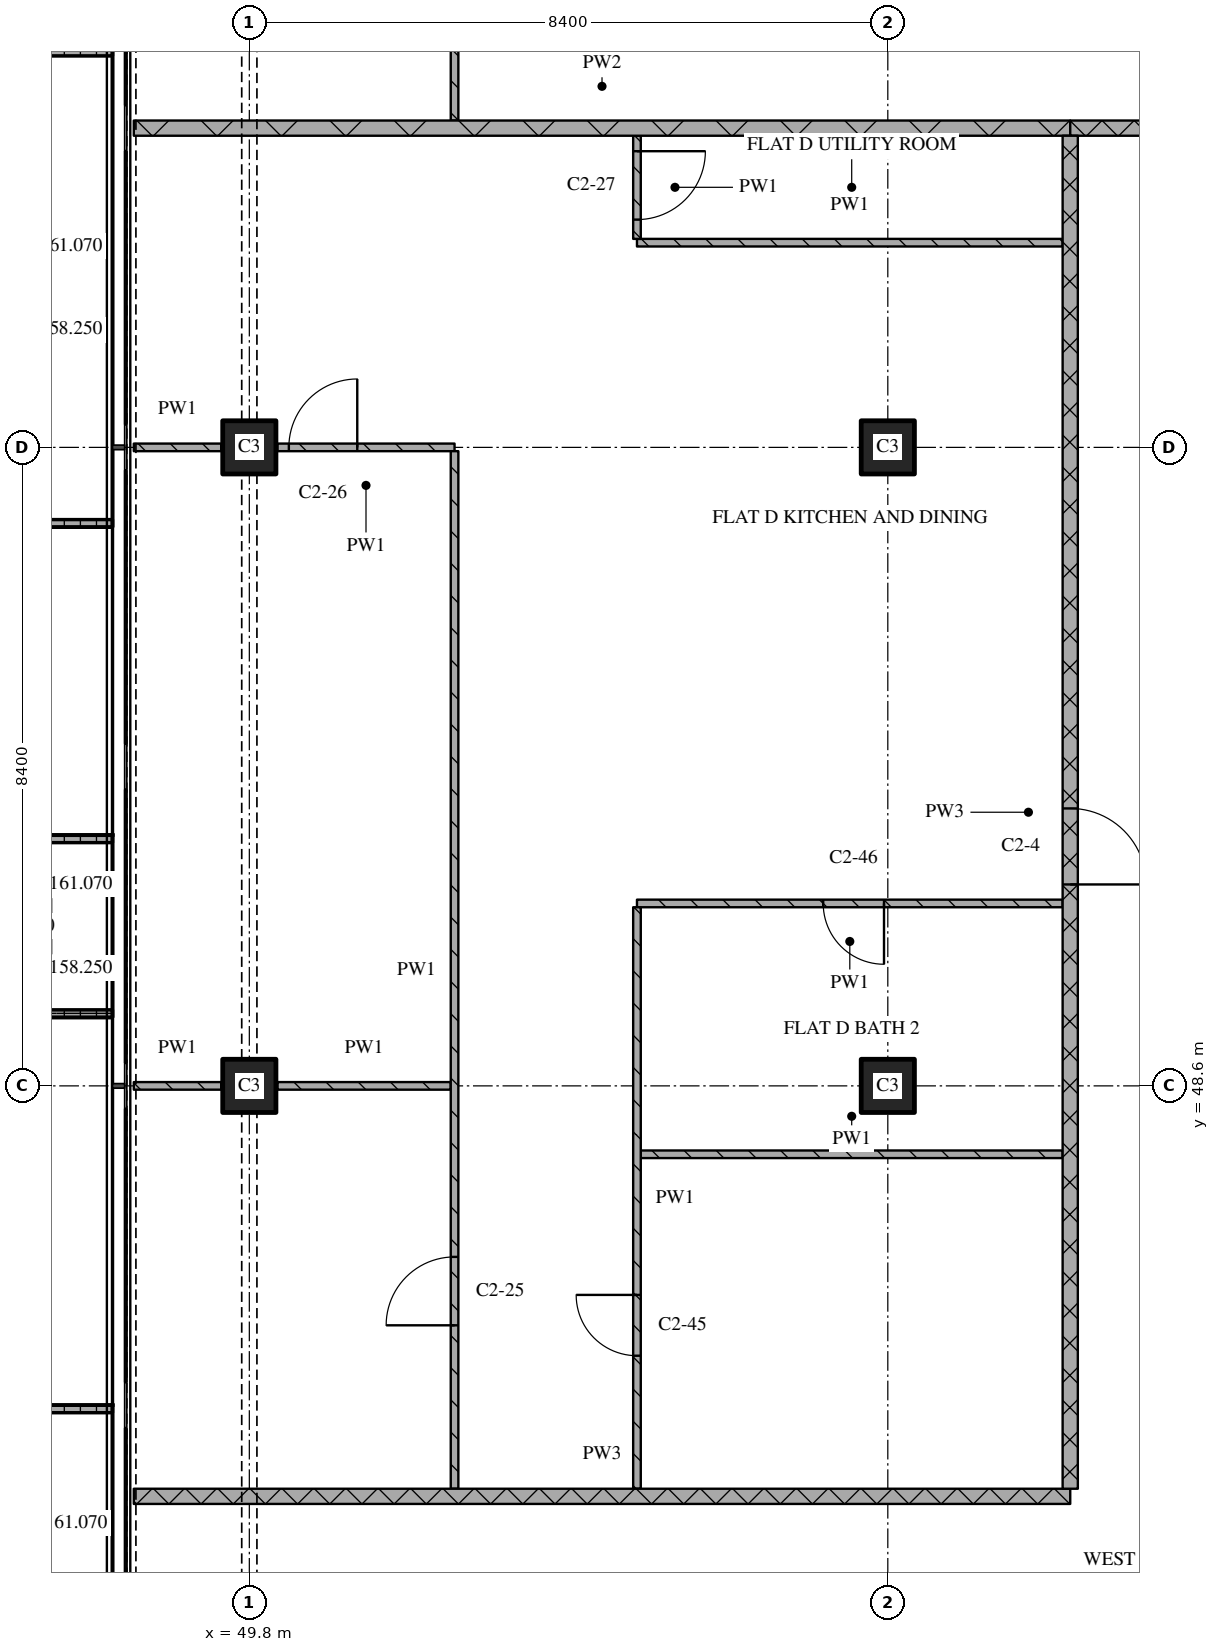
"""IFC4 building model, lengths in metres.
Left out: names, types, materials, properties, quantities, classifications, styles, units other than length and angle.
Written with IfcOpenShell. Run it as: python <this file> out.ifc"""

import sys

from ifc_helpers import new_model, si_unit, direction, frame, frame_2d, origin, origin_2d, place, context, subcontext, project, spatial, polyline, rectangle, outline, extrude, element, fill, save


model = new_model("IFC4")
c1 = context("Model", 3, precision=1e-05, world=origin(), true_north=direction((0.0, 1.0)))
c2 = subcontext(c1, "Body", "Model", "MODEL_VIEW")
j1 = project(units=[si_unit("LENGTHUNIT", "METRE"), si_unit("PLANEANGLEUNIT", "RADIAN")], contexts=[c1])
p1 = place(None, origin())
s1 = spatial("IfcSite", under=j1, at=p1, CompositionType="ELEMENT")
p2 = place(p1, origin())
s2 = spatial("IfcBuilding", under=s1, at=p2, CompositionType="ELEMENT")
p3 = place(p2, frame((0.0, 0.0, 158.25)))
s3 = spatial("IfcBuildingStorey", under=s2, at=p3, CompositionType="ELEMENT", Elevation=158.25)
for number, where, z_axis, x_axis in (
    (1, (49.8, 48.6, 0.0), (0.0, 0.0, 1.0), (1.0, 0.0, 0.0)),
    (2, (49.8, 57.0, 0.0), (0.0, 0.0, 1.0), (1.0, 0.0, 0.0)),
    (3, (58.2, 48.6, 0.0), (0.0, 0.0, 1.0), (1.0, 0.0, 0.0)),
    (4, (58.2, 57.0, 0.0), (0.0, 0.0, 1.0), (1.0, 0.0, 0.0)),
):
    element("IfcColumn", number, at=place(p3, frame(where, z_axis=z_axis, x_axis=x_axis)), inside=s3, PredefinedType="COLUMN", context=c2, shape_type="SweptSolid", body=[
        extrude(rectangle(XDim=0.7, YDim=0.7, at=origin_2d()), origin(), (0.0, 0.0, 1.0), 3.6),
    ])
p4 = place(p3, origin())
e5 = element("IfcWall", 5, at=p4, inside=s3, PredefinedType="SOLIDWALL", context=c2, shape_type="SweptSolid", body=[
    extrude(outline(polyline([(48.0, 62.25), (48.0, 62.15), (46.233, 62.15), (46.233, 56.05), (48.0, 56.05), (48.0, 55.95), (46.133, 55.95), (46.133, 62.25), (48.0, 62.25)])), origin(), (0.0, 0.0, 1.0), 1.0),
])
p5 = place(p3, origin())
e6 = element("IfcWall", 6, at=p5, inside=s3, PredefinedType="SOLIDWALL", context=c2, shape_type="SweptSolid", body=[
    extrude(outline(polyline([(48.0, 51.9), (48.0, 51.8), (46.5, 51.8), (46.5, 49.6), (48.0, 49.6), (48.0, 49.5), (46.4, 49.5), (46.4, 51.9), (48.0, 51.9)])), origin(), (0.0, 0.0, 1.0), 1.0),
])
p6 = place(p3, origin())
e7 = element("IfcWall", 7, at=p6, inside=s3, PredefinedType="SOLIDWALL", context=c2, shape_type="SweptSolid", body=[
    extrude(outline(polyline([(48.0, 44.4), (48.0, 44.3), (46.367, 44.3), (46.367, 40.3), (48.0, 40.3), (48.0, 40.2), (46.267, 40.2), (46.267, 44.4), (48.0, 44.4)])), origin(), (0.0, 0.0, 1.0), 1.0),
])
p7 = place(p3, frame((48.28, 43.2, 0.0), z_axis=(0.0, 0.0, 1.0), x_axis=(1.0, 0.0, 0.0)))
e8 = element("IfcWall", 8, at=p7, inside=s3, PredefinedType="PARTITIONING", context=c2, shape_type="SweptSolid", body=[
    extrude(rectangle(XDim=12.32, YDim=0.2, at=frame_2d((6.16, 0.0))), origin(), (0.0, 0.0, 1.0), 3.32),
])
p8 = place(p3, frame((54.95, 47.7, 0.0), z_axis=(0.0, 0.0, 1.0), x_axis=(1.0, 0.0, 0.0)))
e9 = element("IfcWall", 9, at=p8, inside=s3, PredefinedType="PARTITIONING", context=c2, shape_type="SweptSolid", body=[
    extrude(rectangle(XDim=5.55, YDim=0.1, at=frame_2d((2.775, 0.0))), origin(), (0.0, 0.0, 1.0), 3.32),
])
p9 = place(p3, frame((48.28, 48.6, 0.0), z_axis=(0.0, 0.0, 1.0), x_axis=(1.0, 0.0, 0.0)))
e10 = element("IfcWall", 10, at=p9, inside=s3, PredefinedType="PARTITIONING", context=c2, shape_type="SweptSolid", body=[
    extrude(rectangle(XDim=1.15, YDim=0.1, at=frame_2d((0.575, 0.0))), origin(), (0.0, 0.0, 1.0), 3.32),
])
p10 = place(p3, frame((50.17, 48.6, 0.0), z_axis=(0.0, 0.0, 1.0), x_axis=(1.0, 0.0, 0.0)))
e11 = element("IfcWall", 11, at=p10, inside=s3, PredefinedType="PARTITIONING", context=c2, shape_type="SweptSolid", body=[
    extrude(rectangle(XDim=2.28, YDim=0.1, at=frame_2d((1.14, 0.0))), origin(), (0.0, 0.0, 1.0), 3.32),
])
p11 = place(p3, frame((60.5, 51.0, 0.0), z_axis=(0.0, 0.0, 1.0), x_axis=(-1.0, 0.0, 0.0)))
e12 = element("IfcWall", 12, at=p11, inside=s3, PredefinedType="PARTITIONING", context=c2, shape_type="SweptSolid", body=[
    extrude(rectangle(XDim=5.6, YDim=0.1, at=frame_2d((2.8, 0.0))), origin(), (0.0, 0.0, 1.0), 3.32),
])
p12 = place(p11, frame((2.35, 0.0, 0.0)))
e13 = element("IfcOpeningElement", 13, at=p12, cuts=e12, PredefinedType="OPENING", context=c2, shape_type="SweptSolid", body=[
    extrude(rectangle(XDim=0.8, YDim=2.1, at=frame_2d((0.4, 1.05))), frame((0.0, 0.06, 0.0), z_axis=(0.0, -1.0, 0.0), x_axis=(1.0, 0.0, 0.0)), (0.0, 0.0, 1.0), 0.12),
])
p13 = place(p3, frame((48.28, 57.0, 0.0), z_axis=(0.0, 0.0, 1.0), x_axis=(1.0, 0.0, 0.0)))
e14 = element("IfcWall", 14, at=p13, inside=s3, PredefinedType="PARTITIONING", context=c2, shape_type="SweptSolid", body=[
    extrude(rectangle(XDim=1.15, YDim=0.1, at=frame_2d((0.575, 0.0))), origin(), (0.0, 0.0, 1.0), 3.32),
])
p14 = place(p3, frame((52.5, 57.0, 0.0), z_axis=(0.0, 0.0, 1.0), x_axis=(-1.0, 0.0, 0.0)))
e15 = element("IfcWall", 15, at=p14, inside=s3, PredefinedType="PARTITIONING", context=c2, shape_type="SweptSolid", body=[
    extrude(rectangle(XDim=2.33, YDim=0.1, at=frame_2d((1.165, 0.0))), origin(), (0.0, 0.0, 1.0), 3.32),
])
p15 = place(p14, frame((1.28, 0.0, 0.0)))
e16 = element("IfcOpeningElement", 16, at=p15, cuts=e15, PredefinedType="OPENING", context=c2, shape_type="SweptSolid", body=[
    extrude(rectangle(XDim=0.9, YDim=2.1, at=frame_2d((0.45, 1.05))), frame((0.0, 0.06, 0.0), z_axis=(0.0, -1.0, 0.0), x_axis=(1.0, 0.0, 0.0)), (0.0, 0.0, 1.0), 0.12),
])
p16 = place(p3, frame((54.9, 59.693, 0.0), z_axis=(0.0, 0.0, 1.0), x_axis=(1.0, 0.0, 0.0)))
e17 = element("IfcWall", 17, at=p16, inside=s3, PredefinedType="PARTITIONING", context=c2, shape_type="SweptSolid", body=[
    extrude(rectangle(XDim=5.6, YDim=0.1, at=frame_2d((2.8, 0.0))), origin(), (0.0, 0.0, 1.0), 3.32),
])
p17 = place(p3, frame((60.6, 61.2, 0.0), z_axis=(0.0, 0.0, 1.0), x_axis=(1.0, 0.0, 0.0)))
e18 = element("IfcWall", 18, at=p17, inside=s3, PredefinedType="PARTITIONING", context=c2, shape_type="SweptSolid", body=[
    extrude(rectangle(XDim=3.6, YDim=0.2, at=frame_2d((1.8, 0.0))), origin(), (0.0, 0.0, 1.0), 3.32),
])
p18 = place(p3, frame((48.28, 61.2, 0.0), z_axis=(0.0, 0.0, 1.0), x_axis=(1.0, 0.0, 0.0)))
e19 = element("IfcWall", 19, at=p18, inside=s3, PredefinedType="PARTITIONING", context=c2, shape_type="SweptSolid", body=[
    extrude(rectangle(XDim=12.32, YDim=0.2, at=frame_2d((6.16, 0.0))), origin(), (0.0, 0.0, 1.0), 3.32),
])
p19 = place(p3, frame((52.5, 43.3, 0.0), z_axis=(0.0, 0.0, 1.0), x_axis=(0.0, 1.0, 0.0)))
e20 = element("IfcWall", 20, at=p19, inside=s3, PredefinedType="PARTITIONING", context=c2, shape_type="SweptSolid", body=[
    extrude(rectangle(XDim=13.65, YDim=0.1, at=frame_2d((6.825, 0.0))), origin(), (0.0, 0.0, 1.0), 3.32),
])
p20 = place(p19, frame((2.15, 0.0, 0.0)))
e21 = element("IfcOpeningElement", 21, at=p20, cuts=e20, PredefinedType="OPENING", context=c2, shape_type="SweptSolid", body=[
    extrude(rectangle(XDim=0.9, YDim=2.1, at=frame_2d((0.45, 1.05))), frame((0.0, 0.06, 0.0), z_axis=(0.0, -1.0, 0.0), x_axis=(1.0, 0.0, 0.0)), (0.0, 0.0, 1.0), 0.12),
])
p21 = place(p3, frame((52.5, 61.3, 0.0), z_axis=(0.0, 0.0, 1.0), x_axis=(0.0, 1.0, 0.0)))
e22 = element("IfcWall", 22, at=p21, inside=s3, PredefinedType="PARTITIONING", context=c2, shape_type="SweptSolid", body=[
    extrude(rectangle(XDim=8.25, YDim=0.1, at=frame_2d((4.125, 0.0))), origin(), (0.0, 0.0, 1.0), 3.32),
])
p22 = place(p21, frame((3.65, 0.0, 0.0)))
e23 = element("IfcOpeningElement", 23, at=p22, cuts=e22, PredefinedType="OPENING", context=c2, shape_type="SweptSolid", body=[
    extrude(rectangle(XDim=0.9, YDim=2.1, at=frame_2d((0.45, 1.05))), frame((0.0, 0.06, 0.0), z_axis=(0.0, -1.0, 0.0), x_axis=(1.0, 0.0, 0.0)), (0.0, 0.0, 1.0), 0.12),
])
p23 = place(p3, frame((54.9, 50.95, 0.0), z_axis=(0.0, 0.0, 1.0), x_axis=(0.0, -1.0, 0.0)))
e24 = element("IfcWall", 24, at=p23, inside=s3, PredefinedType="PARTITIONING", context=c2, shape_type="SweptSolid", body=[
    extrude(rectangle(XDim=7.65, YDim=0.1, at=frame_2d((3.825, 0.0))), origin(), (0.0, 0.0, 1.0), 3.32),
])
p24 = place(p23, frame((5.1, 0.0, 0.0)))
e25 = element("IfcOpeningElement", 25, at=p24, cuts=e24, PredefinedType="OPENING", context=c2, shape_type="SweptSolid", body=[
    extrude(rectangle(XDim=0.8, YDim=2.1, at=frame_2d((0.4, 1.05))), frame((0.0, 0.06, 0.0), z_axis=(0.0, -1.0, 0.0), x_axis=(1.0, 0.0, 0.0)), (0.0, 0.0, 1.0), 0.12),
])
p25 = place(p3, frame((54.9, 61.1, 0.0), z_axis=(0.0, 0.0, 1.0), x_axis=(0.0, -1.0, 0.0)))
e26 = element("IfcWall", 26, at=p25, inside=s3, PredefinedType="PARTITIONING", context=c2, shape_type="SweptSolid", body=[
    extrude(rectangle(XDim=1.357, YDim=0.1, at=frame_2d((0.679, 0.0))), origin(), (0.0, 0.0, 1.0), 3.32),
])
p26 = place(p25, frame((0.204, 0.0, 0.0)))
e27 = element("IfcOpeningElement", 27, at=p26, cuts=e26, PredefinedType="OPENING", context=c2, shape_type="SweptSolid", body=[
    extrude(rectangle(XDim=0.9, YDim=2.1, at=frame_2d((0.45, 1.05))), frame((0.0, 0.06, 0.0), z_axis=(0.0, -1.0, 0.0), x_axis=(1.0, 0.0, 0.0)), (0.0, 0.0, 1.0), 0.12),
])
p27 = place(p3, frame((60.6, 43.3, 0.0), z_axis=(0.0, 0.0, 1.0), x_axis=(0.0, 1.0, 0.0)))
e28 = element("IfcWall", 28, at=p27, inside=s3, PredefinedType="PARTITIONING", context=c2, shape_type="SweptSolid", body=[
    extrude(rectangle(XDim=17.8, YDim=0.2, at=frame_2d((8.9, 0.0))), origin(), (0.0, 0.0, 1.0), 3.32),
])
p28 = place(p27, frame((7.95, 0.0, 0.0)))
e29 = element("IfcOpeningElement", 29, at=p28, cuts=e28, PredefinedType="OPENING", context=c2, shape_type="SweptSolid", body=[
    extrude(rectangle(XDim=1.0, YDim=2.1, at=frame_2d((0.5, 1.05))), frame((0.0, 0.11, 0.0), z_axis=(0.0, -1.0, 0.0), x_axis=(1.0, 0.0, 0.0)), (0.0, 0.0, 1.0), 0.22),
])
p29 = place(p12, origin())
e30 = element("IfcDoor", 30, at=p29, inside=s3, OperationType="SINGLE_SWING_LEFT", PredefinedType="DOOR", context=c2, shape_type="SweptSolid", body=[
    extrude(rectangle(XDim=0.8, YDim=2.1, at=frame_2d((0.4, 1.05))), frame((0.0, 0.025, 0.0), z_axis=(0.0, -1.0, 0.0), x_axis=(1.0, 0.0, 0.0)), (0.0, 0.0, 1.0), 0.05),
])
fill(e13, e30)
p30 = place(p15, origin())
e31 = element("IfcDoor", 31, at=p30, inside=s3, OperationType="SINGLE_SWING_RIGHT", PredefinedType="DOOR", context=c2, shape_type="SweptSolid", body=[
    extrude(rectangle(XDim=0.9, YDim=2.1, at=frame_2d((0.45, 1.05))), frame((0.0, 0.025, 0.0), z_axis=(0.0, -1.0, 0.0), x_axis=(1.0, 0.0, 0.0)), (0.0, 0.0, 1.0), 0.05),
])
fill(e16, e31)
p31 = place(p20, origin())
e32 = element("IfcDoor", 32, at=p31, inside=s3, OperationType="SINGLE_SWING_LEFT", PredefinedType="DOOR", context=c2, shape_type="SweptSolid", body=[
    extrude(rectangle(XDim=0.9, YDim=2.1, at=frame_2d((0.45, 1.05))), frame((0.0, 0.025, 0.0), z_axis=(0.0, -1.0, 0.0), x_axis=(1.0, 0.0, 0.0)), (0.0, 0.0, 1.0), 0.05),
])
fill(e21, e32)
p32 = place(p24, origin())
e33 = element("IfcDoor", 33, at=p32, inside=s3, OperationType="SINGLE_SWING_RIGHT", PredefinedType="DOOR", context=c2, shape_type="SweptSolid", body=[
    extrude(rectangle(XDim=0.8, YDim=2.1, at=frame_2d((0.4, 1.05))), frame((0.0, 0.025, 0.0), z_axis=(0.0, -1.0, 0.0), x_axis=(1.0, 0.0, 0.0)), (0.0, 0.0, 1.0), 0.05),
])
fill(e25, e33)
p33 = place(p26, origin())
e34 = element("IfcDoor", 34, at=p33, inside=s3, OperationType="SINGLE_SWING_LEFT", PredefinedType="DOOR", context=c2, shape_type="SweptSolid", body=[
    extrude(rectangle(XDim=0.9, YDim=2.1, at=frame_2d((0.45, 1.05))), frame((0.0, 0.025, 0.0), z_axis=(0.0, -1.0, 0.0), x_axis=(1.0, 0.0, 0.0)), (0.0, 0.0, 1.0), 0.05),
])
fill(e27, e34)
p34 = place(p28, origin())
e35 = element("IfcDoor", 35, at=p34, inside=s3, OperationType="SINGLE_SWING_RIGHT", PredefinedType="DOOR", context=c2, shape_type="SweptSolid", body=[
    extrude(rectangle(XDim=1.0, YDim=2.1, at=frame_2d((0.5, 1.05))), frame((0.0, 0.025, 0.0), z_axis=(0.0, -1.0, 0.0), x_axis=(1.0, 0.0, 0.0)), (0.0, 0.0, 1.0), 0.05),
])
fill(e29, e35)
save(model, sys.argv[1])
